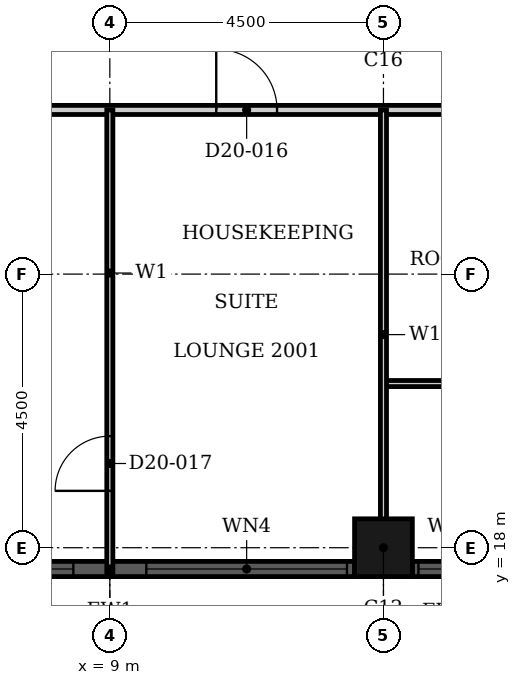
"""IFC4 building model, lengths in metres.
Left out: names, types, materials, properties, quantities, classifications, styles, units other than length and angle.
Written with IfcOpenShell. Run it as: python <this file> out.ifc"""

import sys

from ifc_helpers import new_model, si_unit, direction, frame, frame_2d, origin, origin_2d, place, context, subcontext, project, spatial, rectangle, hollow_rectangle, extrude, element, fill, save


model = new_model("IFC4")
c1 = context("Model", 3, precision=1e-05, world=origin(), true_north=direction((0.0, 1.0)))
c2 = subcontext(c1, "Body", "Model", "MODEL_VIEW")
j1 = project(units=[si_unit("LENGTHUNIT", "METRE"), si_unit("PLANEANGLEUNIT", "RADIAN")], contexts=[c1])
p1 = place(None, origin())
s1 = spatial("IfcSite", under=j1, at=p1, CompositionType="ELEMENT")
p2 = place(p1, origin())
s2 = spatial("IfcBuilding", under=s1, at=p2, CompositionType="ELEMENT")
p3 = place(p2, frame((0.0, 0.0, 85.2)))
s3 = spatial("IfcBuildingStorey", under=s2, at=p3, CompositionType="ELEMENT", Elevation=85.2)
p4 = place(p3, frame((13.5, 18.0, 0.0), z_axis=(0.0, 0.0, 1.0), x_axis=(1.0, 0.0, 0.0)))
e1 = element("IfcColumn", 1, at=p4, inside=s3, PredefinedType="COLUMN", context=c2, shape_type="SweptSolid", body=[
    extrude(hollow_rectangle(XDim=0.95, YDim=0.95, WallThickness=0.03, at=origin_2d()), origin(), (0.0, 0.0, 1.0), 3.6),
])
p5 = place(p3, frame((4.975, 17.65, 0.0), z_axis=(0.0, 0.0, 1.0), x_axis=(1.0, 0.0, 0.0)))
e2 = element("IfcWall", 2, at=p5, inside=s3, PredefinedType="SOLIDWALL", context=c2, shape_type="SweptSolid", body=[
    extrude(rectangle(XDim=8.05, YDim=0.25, at=frame_2d((4.025, 0.0))), origin(), (0.0, 0.0, 1.0), 3.6),
])
p6 = place(p5, frame((0.125, 0.0, 0.9)))
e3 = element("IfcOpeningElement", 3, at=p6, cuts=e2, PredefinedType="OPENING", context=c2, shape_type="SweptSolid", body=[
    extrude(rectangle(XDim=3.3, YDim=2.08, at=frame_2d((1.65, 1.04))), frame((0.0, 0.135, 0.0), z_axis=(0.0, -1.0, 0.0), x_axis=(1.0, 0.0, 0.0)), (0.0, 0.0, 1.0), 0.27),
])
p7 = place(p5, frame((4.625, 0.0, 0.9)))
e4 = element("IfcOpeningElement", 4, at=p7, cuts=e2, PredefinedType="OPENING", context=c2, shape_type="SweptSolid", body=[
    extrude(rectangle(XDim=3.3, YDim=2.08, at=frame_2d((1.65, 1.04))), frame((0.0, 0.135, 0.0), z_axis=(0.0, -1.0, 0.0), x_axis=(1.0, 0.0, 0.0)), (0.0, 0.0, 1.0), 0.27),
])
p8 = place(p3, frame((13.975, 17.65, 0.0), z_axis=(0.0, 0.0, 1.0), x_axis=(1.0, 0.0, 0.0)))
e5 = element("IfcWall", 5, at=p8, inside=s3, PredefinedType="SOLIDWALL", context=c2, shape_type="SweptSolid", body=[
    extrude(rectangle(XDim=1.3, YDim=0.25, at=frame_2d((0.65, 0.0))), origin(), (0.0, 0.0, 1.0), 3.6),
])
p9 = place(p8, frame((0.1, 0.0, 0.9)))
e6 = element("IfcOpeningElement", 6, at=p9, cuts=e5, PredefinedType="OPENING", context=c2, shape_type="SweptSolid", body=[
    extrude(rectangle(XDim=1.1, YDim=2.08, at=frame_2d((0.55, 1.04))), frame((0.0, 0.135, 0.0), z_axis=(0.0, -1.0, 0.0), x_axis=(1.0, 0.0, 0.0)), (0.0, 0.0, 1.0), 0.27),
])
p10 = place(p3, frame((4.5, 25.2, 0.0), z_axis=(0.0, 0.0, 1.0), x_axis=(1.0, 0.0, 0.0)))
e7 = element("IfcWall", 7, at=p10, inside=s3, PredefinedType="PARTITIONING", context=c2, shape_type="SweptSolid", body=[
    extrude(rectangle(XDim=11.7, YDim=0.15, at=frame_2d((5.85, 0.0))), origin(), (0.0, 0.0, 1.0), 3.3),
])
p11 = place(p10, frame((6.25, 0.0, 0.0)))
e8 = element("IfcOpeningElement", 8, at=p11, cuts=e7, PredefinedType="OPENING", context=c2, shape_type="SweptSolid", body=[
    extrude(rectangle(XDim=1.0, YDim=2.1, at=frame_2d((0.5, 1.05))), frame((0.0, 0.085, 0.0), z_axis=(0.0, -1.0, 0.0), x_axis=(1.0, 0.0, 0.0)), (0.0, 0.0, 1.0), 0.17),
])
p12 = place(p3, frame((13.5, 20.7, 0.0), z_axis=(0.0, 0.0, 1.0), x_axis=(1.0, 0.0, 0.0)))
e9 = element("IfcWall", 9, at=p12, inside=s3, PredefinedType="PARTITIONING", context=c2, shape_type="SweptSolid", body=[
    extrude(rectangle(XDim=2.7, YDim=0.1, at=frame_2d((1.35, 0.0))), origin(), (0.0, 0.0, 1.0), 3.3),
])
p13 = place(p3, frame((13.5, 17.81, 0.0), z_axis=(0.0, 0.0, 1.0), x_axis=(0.0, 1.0, 0.0)))
e10 = element("IfcWall", 10, at=p13, inside=s3, PredefinedType="PARTITIONING", context=c2, shape_type="SweptSolid", body=[
    extrude(rectangle(XDim=7.39, YDim=0.1, at=frame_2d((3.695, 0.0))), origin(), (0.0, 0.0, 1.0), 2.38),
])
p14 = place(p3, frame((9.0, 17.585, 0.0), z_axis=(0.0, 0.0, 1.0), x_axis=(0.0, 1.0, 0.0)))
e11 = element("IfcWall", 11, at=p14, inside=s3, PredefinedType="PARTITIONING", context=c2, shape_type="SweptSolid", body=[
    extrude(rectangle(XDim=7.615, YDim=0.1, at=frame_2d((3.808, 0.0))), origin(), (0.0, 0.0, 1.0), 3.3),
])
p15 = place(p14, frame((1.35, 0.0, 0.0)))
e12 = element("IfcOpeningElement", 12, at=p15, cuts=e11, PredefinedType="OPENING", context=c2, shape_type="SweptSolid", body=[
    extrude(rectangle(XDim=0.9, YDim=2.1, at=frame_2d((0.45, 1.05))), frame((0.0, 0.06, 0.0), z_axis=(0.0, -1.0, 0.0), x_axis=(1.0, 0.0, 0.0)), (0.0, 0.0, 1.0), 0.12),
])
p16 = place(p6, origin())
e13 = element("IfcWindow", 13, at=p16, inside=s3, PartitioningType="SINGLE_PANEL", PredefinedType="WINDOW", context=c2, shape_type="SweptSolid", body=[
    extrude(rectangle(XDim=3.3, YDim=2.08, at=frame_2d((1.65, 1.04))), frame((0.0, 0.03, 0.0), z_axis=(0.0, -1.0, 0.0), x_axis=(1.0, 0.0, 0.0)), (0.0, 0.0, 1.0), 0.06),
])
fill(e3, e13)
p17 = place(p7, origin())
e14 = element("IfcWindow", 14, at=p17, inside=s3, PartitioningType="SINGLE_PANEL", PredefinedType="WINDOW", context=c2, shape_type="SweptSolid", body=[
    extrude(rectangle(XDim=3.3, YDim=2.08, at=frame_2d((1.65, 1.04))), frame((0.0, 0.03, 0.0), z_axis=(0.0, -1.0, 0.0), x_axis=(1.0, 0.0, 0.0)), (0.0, 0.0, 1.0), 0.06),
])
fill(e4, e14)
p18 = place(p9, origin())
e15 = element("IfcWindow", 15, at=p18, inside=s3, PartitioningType="SINGLE_PANEL", PredefinedType="WINDOW", context=c2, shape_type="SweptSolid", body=[
    extrude(rectangle(XDim=1.1, YDim=2.08, at=frame_2d((0.55, 1.04))), frame((0.0, 0.03, 0.0), z_axis=(0.0, -1.0, 0.0), x_axis=(1.0, 0.0, 0.0)), (0.0, 0.0, 1.0), 0.06),
])
fill(e6, e15)
p19 = place(p11, origin())
e16 = element("IfcDoor", 16, at=p19, inside=s3, OperationType="SINGLE_SWING_RIGHT", PredefinedType="DOOR", context=c2, shape_type="SweptSolid", body=[
    extrude(rectangle(XDim=1.0, YDim=2.1, at=frame_2d((0.5, 1.05))), frame((0.0, 0.025, 0.0), z_axis=(0.0, -1.0, 0.0), x_axis=(1.0, 0.0, 0.0)), (0.0, 0.0, 1.0), 0.05),
])
fill(e8, e16)
p20 = place(p15, origin())
e17 = element("IfcDoor", 17, at=p20, inside=s3, OperationType="SINGLE_SWING_LEFT", PredefinedType="DOOR", context=c2, shape_type="SweptSolid", body=[
    extrude(rectangle(XDim=0.9, YDim=2.1, at=frame_2d((0.45, 1.05))), frame((0.0, 0.025, 0.0), z_axis=(0.0, -1.0, 0.0), x_axis=(1.0, 0.0, 0.0)), (0.0, 0.0, 1.0), 0.05),
])
fill(e12, e17)
save(model, sys.argv[1])
